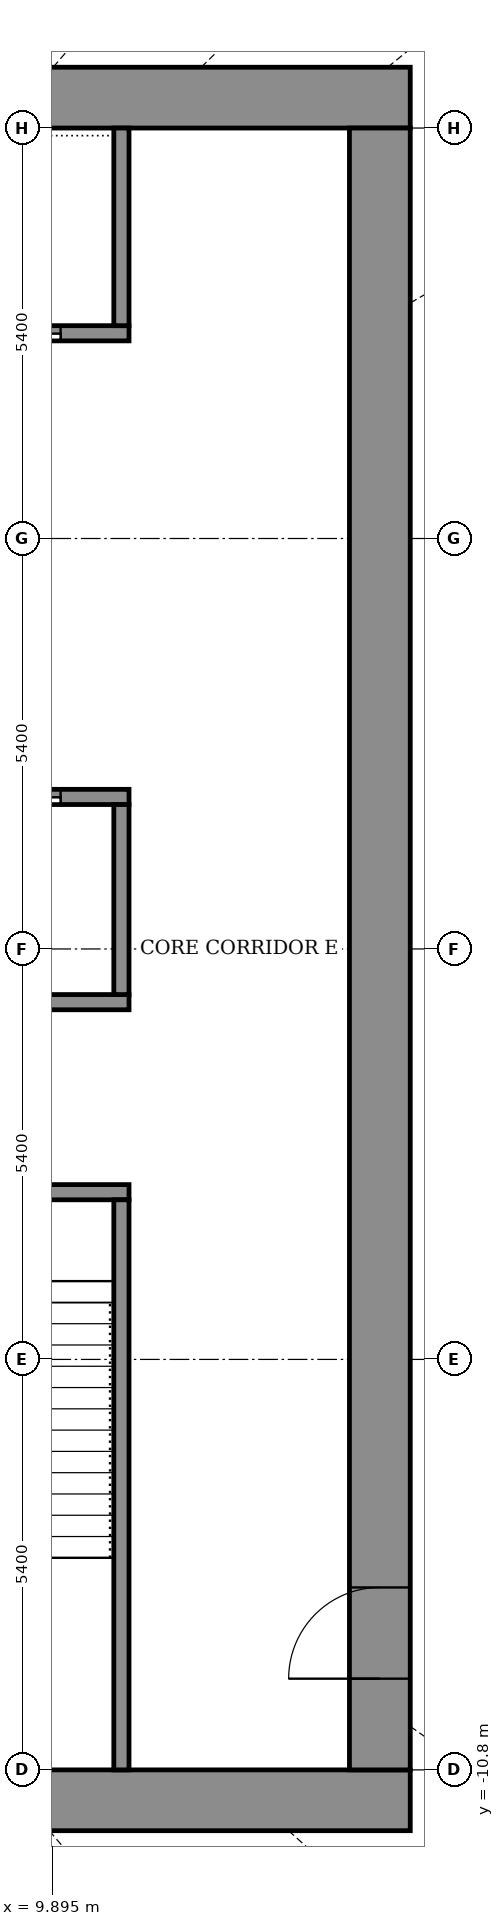
"""IFC4 building model, lengths in metres.
Left out: names, types, materials, properties, quantities, classifications, styles, units other than length and angle.
Written with IfcOpenShell. Run it as: python <this file> out.ifc"""

import sys

from ifc_helpers import new_model, si_unit, direction, frame, frame_2d, origin, place, context, subcontext, project, spatial, rectangle, extrude, element, fill, save


model = new_model("IFC4")
c1 = context("Model", 3, precision=1e-05, world=origin(), true_north=direction((0.0, 1.0)))
c2 = subcontext(c1, "Body", "Model", "MODEL_VIEW")
j1 = project(units=[si_unit("LENGTHUNIT", "METRE"), si_unit("PLANEANGLEUNIT", "RADIAN")], contexts=[c1])
p1 = place(None, origin())
s1 = spatial("IfcSite", under=j1, at=p1, CompositionType="ELEMENT")
p2 = place(p1, origin())
s2 = spatial("IfcBuilding", under=s1, at=p2, CompositionType="ELEMENT")
p3 = place(p2, frame((0.0, 0.0, 193.3)))
s3 = spatial("IfcBuildingStorey", under=s2, at=p3, CompositionType="ELEMENT", Elevation=193.3)
for number, where, z_axis, x_axis in (
    (1, (-14.6, -11.2, 0.0), (0.0, 0.0, 1.0), (1.0, 0.0, 0.0)),
    (2, (-14.6, 11.2, 0.0), (0.0, 0.0, 1.0), (1.0, 0.0, 0.0)),
):
    element("IfcWall", number, at=place(p3, frame(where, z_axis=z_axis, x_axis=x_axis)), inside=s3, PredefinedType="SHEAR", context=c2, shape_type="SweptSolid", body=[
        extrude(rectangle(XDim=29.2, YDim=0.8, at=frame_2d((14.6, 0.0))), origin(), (0.0, 0.0, 1.0), 4.6),
    ])
p4 = place(p3, frame((14.2, -10.8, 0.0), z_axis=(0.0, 0.0, 1.0), x_axis=(0.0, 1.0, 0.0)))
e3 = element("IfcWall", 3, at=p4, inside=s3, PredefinedType="SHEAR", context=c2, shape_type="SweptSolid", body=[
    extrude(rectangle(XDim=21.6, YDim=0.8, at=frame_2d((10.8, 0.0))), origin(), (0.0, 0.0, 1.0), 4.6),
])
p5 = place(p4, frame((1.2, 0.0, 0.0)))
e4 = element("IfcOpeningElement", 4, at=p5, cuts=e3, PredefinedType="OPENING", context=c2, shape_type="SweptSolid", body=[
    extrude(rectangle(XDim=1.2, YDim=2.1, at=frame_2d((0.6, 1.05))), frame((0.0, 0.41, 0.0), z_axis=(0.0, -1.0, 0.0), x_axis=(1.0, 0.0, 0.0)), (0.0, 0.0, 1.0), 0.82),
])
p6 = place(p3, frame((-10.9, -3.2, 0.0), z_axis=(0.0, 0.0, 1.0), x_axis=(1.0, 0.0, 0.0)))
e5 = element("IfcWall", 5, at=p6, inside=s3, PredefinedType="SHEAR", context=c2, shape_type="SweptSolid", body=[
    extrude(rectangle(XDim=21.8, YDim=0.2, at=frame_2d((10.9, 0.0))), origin(), (0.0, 0.0, 1.0), 4.05),
])
p7 = place(p6, frame((1.075, 0.0, 0.0)))
e6 = element("IfcOpeningElement", 6, at=p7, cuts=e5, PredefinedType="OPENING", context=c2, shape_type="SweptSolid", body=[
    extrude(rectangle(XDim=1.1, YDim=2.1, at=frame_2d((0.55, 1.05))), frame((0.0, 0.11, 0.0), z_axis=(0.0, -1.0, 0.0), x_axis=(1.0, 0.0, 0.0)), (0.0, 0.0, 1.0), 0.22),
])
p8 = place(p6, frame((10.325, 0.0, 0.0)))
e7 = element("IfcOpeningElement", 7, at=p8, cuts=e5, PredefinedType="OPENING", context=c2, shape_type="SweptSolid", body=[
    extrude(rectangle(XDim=1.1, YDim=2.1, at=frame_2d((0.55, 1.05))), frame((0.0, 0.11, 0.0), z_axis=(0.0, -1.0, 0.0), x_axis=(1.0, 0.0, 0.0)), (0.0, 0.0, 1.0), 0.22),
])
p9 = place(p6, frame((19.625, 0.0, 0.0)))
e8 = element("IfcOpeningElement", 8, at=p9, cuts=e5, PredefinedType="OPENING", context=c2, shape_type="SweptSolid", body=[
    extrude(rectangle(XDim=1.1, YDim=2.1, at=frame_2d((0.55, 1.05))), frame((0.0, 0.11, 0.0), z_axis=(0.0, -1.0, 0.0), x_axis=(1.0, 0.0, 0.0)), (0.0, 0.0, 1.0), 0.22),
])
p10 = place(p6, frame((5.7, 0.0, 0.0)))
e9 = element("IfcOpeningElement", 9, at=p10, cuts=e5, PredefinedType="OPENING", context=c2, shape_type="SweptSolid", body=[
    extrude(rectangle(XDim=1.1, YDim=2.1, at=frame_2d((0.55, 1.05))), frame((0.0, 0.11, 0.0), z_axis=(0.0, -1.0, 0.0), x_axis=(1.0, 0.0, 0.0)), (0.0, 0.0, 1.0), 0.22),
])
p11 = place(p6, frame((14.975, 0.0, 0.0)))
e10 = element("IfcOpeningElement", 10, at=p11, cuts=e5, PredefinedType="OPENING", context=c2, shape_type="SweptSolid", body=[
    extrude(rectangle(XDim=1.1, YDim=2.1, at=frame_2d((0.55, 1.05))), frame((0.0, 0.11, 0.0), z_axis=(0.0, -1.0, 0.0), x_axis=(1.0, 0.0, 0.0)), (0.0, 0.0, 1.0), 0.22),
])
p12 = place(p3, frame((-10.9, -0.7, 0.0), z_axis=(0.0, 0.0, 1.0), x_axis=(1.0, 0.0, 0.0)))
e11 = element("IfcWall", 11, at=p12, inside=s3, PredefinedType="SHEAR", context=c2, shape_type="SweptSolid", body=[
    extrude(rectangle(XDim=21.8, YDim=0.2, at=frame_2d((10.9, 0.0))), origin(), (0.0, 0.0, 1.0), 4.05),
])
p13 = place(p3, frame((-10.9, 2.0, 0.0), z_axis=(0.0, 0.0, 1.0), x_axis=(1.0, 0.0, 0.0)))
e12 = element("IfcWall", 12, at=p13, inside=s3, PredefinedType="SHEAR", context=c2, shape_type="SweptSolid", body=[
    extrude(rectangle(XDim=21.8, YDim=0.2, at=frame_2d((10.9, 0.0))), origin(), (0.0, 0.0, 1.0), 4.05),
])
p14 = place(p13, frame((14.4, 0.0, 0.0)))
e13 = element("IfcOpeningElement", 13, at=p14, cuts=e12, PredefinedType="OPENING", context=c2, shape_type="SweptSolid", body=[
    extrude(rectangle(XDim=1.1, YDim=2.1, at=frame_2d((0.55, 1.05))), frame((0.0, 0.11, 0.0), z_axis=(0.0, -1.0, 0.0), x_axis=(1.0, 0.0, 0.0)), (0.0, 0.0, 1.0), 0.22),
])
p15 = place(p13, frame((17.1, 0.0, 0.0)))
e14 = element("IfcOpeningElement", 14, at=p15, cuts=e12, PredefinedType="OPENING", context=c2, shape_type="SweptSolid", body=[
    extrude(rectangle(XDim=1.1, YDim=2.1, at=frame_2d((0.55, 1.05))), frame((0.0, 0.11, 0.0), z_axis=(0.0, -1.0, 0.0), x_axis=(1.0, 0.0, 0.0)), (0.0, 0.0, 1.0), 0.22),
])
p16 = place(p13, frame((19.8, 0.0, 0.0)))
e15 = element("IfcOpeningElement", 15, at=p16, cuts=e12, PredefinedType="OPENING", context=c2, shape_type="SweptSolid", body=[
    extrude(rectangle(XDim=1.1, YDim=2.1, at=frame_2d((0.55, 1.05))), frame((0.0, 0.11, 0.0), z_axis=(0.0, -1.0, 0.0), x_axis=(1.0, 0.0, 0.0)), (0.0, 0.0, 1.0), 0.22),
])
p17 = place(p13, frame((6.4, 0.0, 0.0)))
e16 = element("IfcOpeningElement", 16, at=p17, cuts=e12, PredefinedType="OPENING", context=c2, shape_type="SweptSolid", body=[
    extrude(rectangle(XDim=0.9, YDim=2.1, at=frame_2d((0.45, 1.05))), frame((0.0, 0.11, 0.0), z_axis=(0.0, -1.0, 0.0), x_axis=(1.0, 0.0, 0.0)), (0.0, 0.0, 1.0), 0.22),
])
p18 = place(p3, frame((-10.9, 8.1, 0.0), z_axis=(0.0, 0.0, 1.0), x_axis=(1.0, 0.0, 0.0)))
e17 = element("IfcWall", 17, at=p18, inside=s3, PredefinedType="SHEAR", context=c2, shape_type="SweptSolid", body=[
    extrude(rectangle(XDim=21.8, YDim=0.2, at=frame_2d((10.9, 0.0))), origin(), (0.0, 0.0, 1.0), 4.05),
])
p19 = place(p18, frame((14.4, 0.0, 0.0)))
e18 = element("IfcOpeningElement", 18, at=p19, cuts=e17, PredefinedType="OPENING", context=c2, shape_type="SweptSolid", body=[
    extrude(rectangle(XDim=1.1, YDim=2.1, at=frame_2d((0.55, 1.05))), frame((0.0, 0.11, 0.0), z_axis=(0.0, -1.0, 0.0), x_axis=(1.0, 0.0, 0.0)), (0.0, 0.0, 1.0), 0.22),
])
p20 = place(p18, frame((17.1, 0.0, 0.0)))
e19 = element("IfcOpeningElement", 19, at=p20, cuts=e17, PredefinedType="OPENING", context=c2, shape_type="SweptSolid", body=[
    extrude(rectangle(XDim=1.1, YDim=2.1, at=frame_2d((0.55, 1.05))), frame((0.0, 0.11, 0.0), z_axis=(0.0, -1.0, 0.0), x_axis=(1.0, 0.0, 0.0)), (0.0, 0.0, 1.0), 0.22),
])
p21 = place(p18, frame((19.8, 0.0, 0.0)))
e20 = element("IfcOpeningElement", 20, at=p21, cuts=e17, PredefinedType="OPENING", context=c2, shape_type="SweptSolid", body=[
    extrude(rectangle(XDim=1.1, YDim=2.1, at=frame_2d((0.55, 1.05))), frame((0.0, 0.11, 0.0), z_axis=(0.0, -1.0, 0.0), x_axis=(1.0, 0.0, 0.0)), (0.0, 0.0, 1.0), 0.22),
])
p22 = place(p18, frame((1.675, 0.0, 0.0)))
e21 = element("IfcOpeningElement", 21, at=p22, cuts=e17, PredefinedType="OPENING", context=c2, shape_type="SweptSolid", body=[
    extrude(rectangle(XDim=0.9, YDim=2.1, at=frame_2d((0.45, 1.05))), frame((0.0, 0.11, 0.0), z_axis=(0.0, -1.0, 0.0), x_axis=(1.0, 0.0, 0.0)), (0.0, 0.0, 1.0), 0.22),
])
p23 = place(p18, frame((8.425, 0.0, 0.0)))
e22 = element("IfcOpeningElement", 22, at=p23, cuts=e17, PredefinedType="OPENING", context=c2, shape_type="SweptSolid", body=[
    extrude(rectangle(XDim=0.9, YDim=2.1, at=frame_2d((0.45, 1.05))), frame((0.0, 0.11, 0.0), z_axis=(0.0, -1.0, 0.0), x_axis=(1.0, 0.0, 0.0)), (0.0, 0.0, 1.0), 0.22),
])
p24 = place(p3, frame((10.8, -10.8, 0.0), z_axis=(0.0, 0.0, 1.0), x_axis=(0.0, 1.0, 0.0)))
e23 = element("IfcWall", 23, at=p24, inside=s3, PredefinedType="SHEAR", context=c2, shape_type="SweptSolid", body=[
    extrude(rectangle(XDim=7.5, YDim=0.2, at=frame_2d((3.75, 0.0))), origin(), (0.0, 0.0, 1.0), 4.05),
])
p25 = place(p3, frame((10.8, -0.6, 0.0), z_axis=(0.0, 0.0, 1.0), x_axis=(0.0, 1.0, 0.0)))
e24 = element("IfcWall", 24, at=p25, inside=s3, PredefinedType="SHEAR", context=c2, shape_type="SweptSolid", body=[
    extrude(rectangle(XDim=2.5, YDim=0.2, at=frame_2d((1.25, 0.0))), origin(), (0.0, 0.0, 1.0), 4.05),
])
p26 = place(p3, frame((10.8, 8.2, 0.0), z_axis=(0.0, 0.0, 1.0), x_axis=(0.0, 1.0, 0.0)))
e25 = element("IfcWall", 25, at=p26, inside=s3, PredefinedType="SHEAR", context=c2, shape_type="SweptSolid", body=[
    extrude(rectangle(XDim=2.6, YDim=0.2, at=frame_2d((1.3, 0.0))), origin(), (0.0, 0.0, 1.0), 4.05),
])
p27 = place(p5, origin())
e26 = element("IfcDoor", 26, at=p27, inside=s3, OperationType="DOUBLE_DOOR_SINGLE_SWING", PredefinedType="DOOR", context=c2, shape_type="SweptSolid", body=[
    extrude(rectangle(XDim=1.2, YDim=2.1, at=frame_2d((0.6, 1.05))), frame((0.0, 0.025, 0.0), z_axis=(0.0, -1.0, 0.0), x_axis=(1.0, 0.0, 0.0)), (0.0, 0.0, 1.0), 0.05),
])
fill(e4, e26)
p28 = place(p16, origin())
e27 = element("IfcDoor", 27, at=p28, inside=s3, OperationType="SLIDING_TO_LEFT", PredefinedType="DOOR", context=c2, shape_type="SweptSolid", body=[
    extrude(rectangle(XDim=1.1, YDim=2.1, at=frame_2d((0.55, 1.05))), frame((0.0, 0.025, 0.0), z_axis=(0.0, -1.0, 0.0), x_axis=(1.0, 0.0, 0.0)), (0.0, 0.0, 1.0), 0.05),
])
fill(e15, e27)
p29 = place(p21, origin())
e28 = element("IfcDoor", 28, at=p29, inside=s3, OperationType="SLIDING_TO_LEFT", PredefinedType="DOOR", context=c2, shape_type="SweptSolid", body=[
    extrude(rectangle(XDim=1.1, YDim=2.1, at=frame_2d((0.55, 1.05))), frame((0.0, 0.025, 0.0), z_axis=(0.0, -1.0, 0.0), x_axis=(1.0, 0.0, 0.0)), (0.0, 0.0, 1.0), 0.05),
])
fill(e20, e28)
save(model, sys.argv[1])
